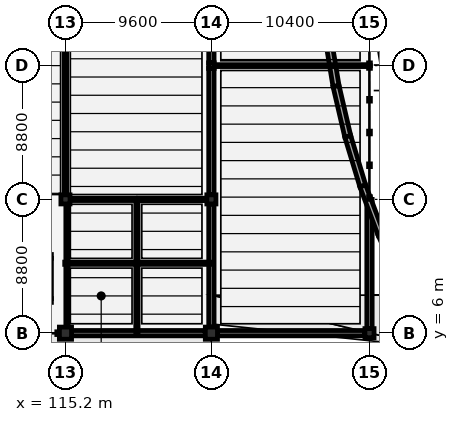
"""IFC4 building model, lengths in metres.
Left out: names, types, materials, properties, quantities, classifications, styles, units other than length and angle.
Written with IfcOpenShell. Run it as: python <this file> out.ifc"""

import sys

from ifc_helpers import new_model, si_unit, direction, frame, frame_2d, origin, origin_2d, place, context, subcontext, project, spatial, rectangle, i_section, extrude, element, fill, save


model = new_model("IFC4")
c1 = context("Model", 3, precision=1e-05, world=origin(), true_north=direction((0.0, 1.0)))
c2 = subcontext(c1, "Body", "Model", "MODEL_VIEW")
j1 = project(units=[si_unit("LENGTHUNIT", "METRE"), si_unit("PLANEANGLEUNIT", "RADIAN")], contexts=[c1])
p1 = place(None, origin())
s1 = spatial("IfcSite", under=j1, at=p1, CompositionType="ELEMENT")
p2 = place(p1, origin())
s2 = spatial("IfcBuilding", under=s1, at=p2, CompositionType="ELEMENT")
p3 = place(p2, origin())
s3 = spatial("IfcBuildingStorey", under=s2, at=p3, CompositionType="ELEMENT", Elevation=0.0)
p4 = place(p3, frame((115.2, 6.0, 0.0), z_axis=(0.0, 0.0, 1.0), x_axis=(1.0, 0.0, 0.0)))
e1 = element("IfcColumn", 1, at=p4, inside=s3, PredefinedType="COLUMN", context=c2, shape_type="SweptSolid", body=[
    extrude(rectangle(XDim=0.8, YDim=0.8, at=origin_2d()), origin(), (0.0, 0.0, 1.0), 4.8),
])
p5 = place(p3, frame((115.2, 14.8, 0.0), z_axis=(0.0, 0.0, 1.0), x_axis=(1.0, 0.0, 0.0)))
e2 = element("IfcColumn", 2, at=p5, inside=s3, PredefinedType="COLUMN", context=c2, shape_type="SweptSolid", body=[
    extrude(rectangle(XDim=0.6, YDim=0.6, at=origin_2d()), origin(), (0.0, 0.0, 1.0), 4.8),
])
p6 = place(p3, frame((124.8, 6.0, 0.0), z_axis=(0.0, 0.0, 1.0), x_axis=(1.0, 0.0, 0.0)))
e3 = element("IfcColumn", 3, at=p6, inside=s3, PredefinedType="COLUMN", context=c2, shape_type="SweptSolid", body=[
    extrude(rectangle(XDim=0.8, YDim=0.8, at=origin_2d()), origin(), (0.0, 0.0, 1.0), 4.8),
])
p7 = place(p3, frame((124.8, 14.8, 0.0), z_axis=(0.0, 0.0, 1.0), x_axis=(1.0, 0.0, 0.0)))
e4 = element("IfcColumn", 4, at=p7, inside=s3, PredefinedType="COLUMN", context=c2, shape_type="SweptSolid", body=[
    extrude(rectangle(XDim=0.6, YDim=0.6, at=origin_2d()), origin(), (0.0, 0.0, 1.0), 4.8),
])
p8 = place(p3, frame((124.8, 23.6, 0.0), z_axis=(0.0, 0.0, 1.0), x_axis=(1.0, 0.0, 0.0)))
e5 = element("IfcColumn", 5, at=p8, inside=s3, PredefinedType="COLUMN", context=c2, shape_type="SweptSolid", body=[
    extrude(i_section(OverallWidth=0.368, OverallDepth=0.368, WebThickness=0.015, FlangeThickness=0.024, FilletRadius=0.025, at=origin_2d()), origin(), (0.0, 0.0, 1.0), 4.8),
])
p9 = place(p3, frame((135.2, 6.0, 0.0), z_axis=(0.0, 0.0, 1.0), x_axis=(1.0, 0.0, 0.0)))
e6 = element("IfcColumn", 6, at=p9, inside=s3, PredefinedType="COLUMN", context=c2, shape_type="SweptSolid", body=[
    extrude(rectangle(XDim=0.6, YDim=0.6, at=origin_2d()), origin(), (0.0, 0.0, 1.0), 4.8),
])
p10 = place(p3, frame((115.6, 6.0, 0.0), z_axis=(0.0, 0.0, 1.0), x_axis=(1.0, 0.0, 0.0)))
e7 = element("IfcWall", 7, at=p10, inside=s3, PredefinedType="SOLIDWALL", context=c2, shape_type="SweptSolid", body=[
    extrude(rectangle(XDim=8.8, YDim=0.35, at=frame_2d((4.4, 0.0))), origin(), (0.0, 0.0, 1.0), 4.1),
])
p11 = place(p10, frame((1.4, 0.0, 0.0)))
e8 = element("IfcOpeningElement", 8, at=p11, cuts=e7, PredefinedType="OPENING", context=c2, shape_type="SweptSolid", body=[
    extrude(rectangle(XDim=1.96, YDim=2.37, at=frame_2d((0.98, 1.185))), frame((0.0, 0.185, 0.0), z_axis=(0.0, -1.0, 0.0), x_axis=(1.0, 0.0, 0.0)), (0.0, 0.0, 1.0), 0.37),
])
p12 = place(p10, frame((4.8, 0.0, 0.0)))
e9 = element("IfcOpeningElement", 9, at=p12, cuts=e7, PredefinedType="OPENING", context=c2, shape_type="SweptSolid", body=[
    extrude(rectangle(XDim=1.92, YDim=2.34, at=frame_2d((0.96, 1.17))), frame((0.0, 0.185, 0.0), z_axis=(0.0, -1.0, 0.0), x_axis=(1.0, 0.0, 0.0)), (0.0, 0.0, 1.0), 0.37),
])
p13 = place(p3, frame((124.8, 6.4, 0.0), z_axis=(0.0, 0.0, 1.0), x_axis=(0.0, 1.0, 0.0)))
e10 = element("IfcWall", 10, at=p13, inside=s3, PredefinedType="SOLIDWALL", context=c2, shape_type="SweptSolid", body=[
    extrude(rectangle(XDim=8.1, YDim=0.35, at=frame_2d((4.05, 0.0))), origin(), (0.0, 0.0, 1.0), 4.1),
])
p14 = place(p3, frame((124.8, 15.1, 0.0), z_axis=(0.0, 0.0, 1.0), x_axis=(0.0, 1.0, 0.0)))
e11 = element("IfcWall", 11, at=p14, inside=s3, PredefinedType="SOLIDWALL", context=c2, shape_type="SweptSolid", body=[
    extrude(rectangle(XDim=8.316, YDim=0.35, at=frame_2d((4.158, 0.0))), origin(), (0.0, 0.0, 1.0), 4.1),
])
p15 = place(p14, frame((3.0, 0.0, 0.0)))
e12 = element("IfcOpeningElement", 12, at=p15, cuts=e11, PredefinedType="OPENING", context=c2, shape_type="SweptSolid", body=[
    extrude(rectangle(XDim=1.8, YDim=2.4, at=frame_2d((0.9, 1.2))), frame((0.0, 0.185, 0.0), z_axis=(0.0, -1.0, 0.0), x_axis=(1.0, 0.0, 0.0)), (0.0, 0.0, 1.0), 0.37),
])
p16 = place(p3, frame((124.8, 23.784, 0.0), z_axis=(0.0, 0.0, 1.0), x_axis=(0.0, 1.0, 0.0)))
e13 = element("IfcWall", 13, at=p16, inside=s3, PredefinedType="SOLIDWALL", context=c2, shape_type="SweptSolid", body=[
    extrude(rectangle(XDim=8.432, YDim=0.35, at=frame_2d((4.216, 0.0))), origin(), (0.0, 0.0, 1.0), 4.1),
])
p17 = place(p16, frame((3.0, 0.0, 0.0)))
e14 = element("IfcOpeningElement", 14, at=p17, cuts=e13, PredefinedType="OPENING", context=c2, shape_type="SweptSolid", body=[
    extrude(rectangle(XDim=1.76, YDim=2.37, at=frame_2d((0.88, 1.185))), frame((0.0, 0.185, 0.0), z_axis=(0.0, -1.0, 0.0), x_axis=(1.0, 0.0, 0.0)), (0.0, 0.0, 1.0), 0.37),
])
p18 = place(p3, frame((135.2, 6.3, 0.0), z_axis=(0.0, 0.0, 1.0), x_axis=(0.0, 1.0, 0.0)))
e15 = element("IfcWall", 15, at=p18, inside=s3, PredefinedType="SOLIDWALL", context=c2, shape_type="SweptSolid", body=[
    extrude(rectangle(XDim=8.5, YDim=0.35, at=frame_2d((4.25, 0.0))), origin(), (0.0, 0.0, 1.0), 4.1),
])
p19 = place(p18, frame((1.6, 0.0, 0.0)))
e16 = element("IfcOpeningElement", 16, at=p19, cuts=e15, PredefinedType="OPENING", context=c2, shape_type="SweptSolid", body=[
    extrude(rectangle(XDim=1.76, YDim=2.37, at=frame_2d((0.88, 1.185))), frame((0.0, 0.185, 0.0), z_axis=(0.0, -1.0, 0.0), x_axis=(1.0, 0.0, 0.0)), (0.0, 0.0, 1.0), 0.37),
])
p20 = place(p3, frame((125.2, 6.0, 0.0), z_axis=(0.0, 0.0, 1.0), x_axis=(1.0, 0.0, 0.0)))
e17 = element("IfcWall", 17, at=p20, inside=s3, PredefinedType="SOLIDWALL", context=c2, shape_type="SweptSolid", body=[
    extrude(rectangle(XDim=9.7, YDim=0.35, at=frame_2d((4.85, 0.0))), origin(), (0.0, 0.0, 1.0), 4.1),
])
p21 = place(p3, frame((135.816, 26.056, -1.3), z_axis=(0.0, 0.0, 1.0), x_axis=(0.162941931057, -0.98663566077, 0.0)))
e18 = element("IfcWall", 18, at=p21, inside=s3, PredefinedType="SOLIDWALL", context=c2, shape_type="SweptSolid", body=[
    extrude(rectangle(XDim=3.179, YDim=0.4, at=frame_2d((1.59, 0.0))), origin(), (0.0, 0.0, 1.0), 5.84),
])
p22 = place(p3, frame((132.445, 25.613, -1.3), z_axis=(0.0, 0.0, 1.0), x_axis=(0.162758630432, -0.986665915201, 0.0)))
e19 = element("IfcWall", 19, at=p22, inside=s3, PredefinedType="SOLIDWALL", context=c2, shape_type="SweptSolid", body=[
    extrude(rectangle(XDim=3.404, YDim=0.4, at=frame_2d((1.702, 0.0))), origin(), (0.0, 0.0, 1.0), 5.84),
])
p23 = place(p3, frame((132.999, 22.255, -1.3), z_axis=(0.0, 0.0, 1.0), x_axis=(0.227143430466, -0.973861315587, 0.0)))
e20 = element("IfcWall", 20, at=p23, inside=s3, PredefinedType="SOLIDWALL", context=c2, shape_type="SweptSolid", body=[
    extrude(rectangle(XDim=3.403, YDim=0.4, at=frame_2d((1.701, 0.0))), origin(), (0.0, 0.0, 1.0), 5.84),
])
p24 = place(p3, frame((133.772, 18.941, -1.3), z_axis=(0.0, 0.0, 1.0), x_axis=(0.290387746123, -0.956909064071, 0.0)))
e21 = element("IfcWall", 21, at=p24, inside=s3, PredefinedType="SOLIDWALL", context=c2, shape_type="SweptSolid", body=[
    extrude(rectangle(XDim=3.403, YDim=0.4, at=frame_2d((1.701, 0.0))), origin(), (0.0, 0.0, 1.0), 5.84),
])
for number, where, z_axis, x_axis in (
    (22, (134.76, 15.685, -1.3), (0.0, 0.0, 1.0), (0.352, -0.936, 0.0)),
    (23, (135.958, 12.5, -1.3), (0.0, 0.0, 1.0), (0.413, -0.911, 0.0)),
):
    element("IfcWall", number, at=place(p3, frame(where, z_axis=z_axis, x_axis=x_axis)), inside=s3, PredefinedType="SOLIDWALL", context=c2, shape_type="SweptSolid", body=[
        extrude(rectangle(XDim=3.403, YDim=0.4, at=frame_2d((1.701, 0.0))), origin(), (0.0, 0.0, 1.0), 5.84),
    ])
p25 = place(p3, frame((115.2, 14.9, 0.0), z_axis=(0.0, 0.0, 1.0), x_axis=(0.0, 1.0, 0.0)))
e24 = element("IfcWall", 24, at=p25, inside=s3, PredefinedType="PARTITIONING", context=c2, shape_type="SweptSolid", body=[
    extrude(rectangle(XDim=17.4, YDim=0.16, at=frame_2d((8.7, 0.0))), origin(), (0.0, 0.0, 1.0), 4.42),
])
p26 = place(p25, frame((7.8, 0.0, 0.0)))
e25 = element("IfcOpeningElement", 25, at=p26, cuts=e24, PredefinedType="OPENING", context=c2, shape_type="SweptSolid", body=[
    extrude(rectangle(XDim=1.8, YDim=2.15, at=frame_2d((0.9, 1.075))), frame((0.0, 0.09, 0.0), z_axis=(0.0, -1.0, 0.0), x_axis=(1.0, 0.0, 0.0)), (0.0, 0.0, 1.0), 0.18),
])
p27 = place(p3, frame((115.15, 14.8, 0.0), z_axis=(0.0, 0.0, 1.0), x_axis=(1.0, 0.0, 0.0)))
e26 = element("IfcWall", 26, at=p27, inside=s3, PredefinedType="PARTITIONING", context=c2, shape_type="SweptSolid", body=[
    extrude(rectangle(XDim=4.65, YDim=0.15, at=frame_2d((2.325, 0.0))), origin(), (0.0, 0.0, 1.0), 3.835),
])
p28 = place(p27, frame((1.85, 0.0, 0.0)))
e27 = element("IfcOpeningElement", 27, at=p28, cuts=e26, PredefinedType="OPENING", context=c2, shape_type="SweptSolid", body=[
    extrude(rectangle(XDim=0.95, YDim=2.15, at=frame_2d((0.475, 1.075))), frame((0.0, 0.085, 0.0), z_axis=(0.0, -1.0, 0.0), x_axis=(1.0, 0.0, 0.0)), (0.0, 0.0, 1.0), 0.17),
])
p29 = place(p3, frame((120.0, 14.8, 0.0), z_axis=(0.0, 0.0, 1.0), x_axis=(1.0, 0.0, 0.0)))
e28 = element("IfcWall", 28, at=p29, inside=s3, PredefinedType="PARTITIONING", context=c2, shape_type="SweptSolid", body=[
    extrude(rectangle(XDim=4.75, YDim=0.16, at=frame_2d((2.375, 0.0))), origin(), (0.0, 0.0, 1.0), 3.835),
])
p30 = place(p29, frame((1.475, 0.0, 0.0)))
e29 = element("IfcOpeningElement", 29, at=p30, cuts=e28, PredefinedType="OPENING", context=c2, shape_type="SweptSolid", body=[
    extrude(rectangle(XDim=1.8, YDim=2.15, at=frame_2d((0.9, 1.075))), frame((0.0, 0.09, 0.0), z_axis=(0.0, -1.0, 0.0), x_axis=(1.0, 0.0, 0.0)), (0.0, 0.0, 1.0), 0.18),
])
p31 = place(p3, frame((119.9, 6.05, 0.0), z_axis=(0.0, 0.0, 1.0), x_axis=(0.0, 1.0, 0.0)))
e30 = element("IfcWall", 30, at=p31, inside=s3, PredefinedType="PARTITIONING", context=c2, shape_type="SweptSolid", body=[
    extrude(rectangle(XDim=4.45, YDim=0.15, at=frame_2d((2.225, 0.0))), origin(), (0.0, 0.0, 1.0), 4.42),
])
p32 = place(p3, frame((115.15, 10.6, 0.0), z_axis=(0.0, 0.0, 1.0), x_axis=(1.0, 0.0, 0.0)))
e31 = element("IfcWall", 31, at=p32, inside=s3, PredefinedType="PARTITIONING", context=c2, shape_type="SweptSolid", body=[
    extrude(rectangle(XDim=4.65, YDim=0.15, at=frame_2d((2.325, 0.0))), origin(), (0.0, 0.0, 1.0), 4.42),
])
p33 = place(p3, frame((120.0, 10.6, 0.0), z_axis=(0.0, 0.0, 1.0), x_axis=(1.0, 0.0, 0.0)))
e32 = element("IfcWall", 32, at=p33, inside=s3, PredefinedType="PARTITIONING", context=c2, shape_type="SweptSolid", body=[
    extrude(rectangle(XDim=4.75, YDim=0.15, at=frame_2d((2.375, 0.0))), origin(), (0.0, 0.0, 1.0), 4.42),
])
p34 = place(p33, frame((1.925, 0.0, 0.0)))
e33 = element("IfcOpeningElement", 33, at=p34, cuts=e32, PredefinedType="OPENING", context=c2, shape_type="SweptSolid", body=[
    extrude(rectangle(XDim=0.9, YDim=2.15, at=frame_2d((0.45, 1.075))), frame((0.0, 0.085, 0.0), z_axis=(0.0, -1.0, 0.0), x_axis=(1.0, 0.0, 0.0)), (0.0, 0.0, 1.0), 0.17),
])
p35 = place(p3, frame((119.9, 10.7, 0.0), z_axis=(0.0, 0.0, 1.0), x_axis=(0.0, 1.0, 0.0)))
e34 = element("IfcWall", 34, at=p35, inside=s3, PredefinedType="PARTITIONING", context=c2, shape_type="SweptSolid", body=[
    extrude(rectangle(XDim=4.0, YDim=0.15, at=frame_2d((2.0, 0.0))), origin(), (0.0, 0.0, 1.0), 4.42),
])
p36 = place(p35, frame((1.525, 0.0, 0.0)))
e35 = element("IfcOpeningElement", 35, at=p36, cuts=e34, PredefinedType="OPENING", context=c2, shape_type="SweptSolid", body=[
    extrude(rectangle(XDim=0.95, YDim=2.15, at=frame_2d((0.475, 1.075))), frame((0.0, 0.085, 0.0), z_axis=(0.0, -1.0, 0.0), x_axis=(1.0, 0.0, 0.0)), (0.0, 0.0, 1.0), 0.17),
])
p37 = place(p3, frame((124.75, 23.6, 0.0), z_axis=(0.0, 0.0, 1.0), x_axis=(1.0, 0.0, 0.0)))
e36 = element("IfcWall", 36, at=p37, inside=s3, PredefinedType="PARTITIONING", context=c2, shape_type="SweptSolid", body=[
    extrude(rectangle(XDim=10.4, YDim=0.125, at=frame_2d((5.2, 0.0))), origin(), (0.0, 0.0, 1.0), 3.835),
])
p38 = place(p3, frame((115.3, 6.05, 0.0), z_axis=(0.0, 0.0, 1.0), x_axis=(0.0, 1.0, 0.0)))
e37 = element("IfcWall", 37, at=p38, inside=s3, PredefinedType="PARTITIONING", context=c2, shape_type="SweptSolid", body=[
    extrude(rectangle(XDim=4.31, YDim=0.15, at=frame_2d((2.155, 0.0))), origin(), (0.0, 0.0, 1.0), 4.067),
])
p39 = place(p38, frame((1.705, 0.0, 0.0)))
e38 = element("IfcOpeningElement", 38, at=p39, cuts=e37, PredefinedType="OPENING", context=c2, shape_type="SweptSolid", body=[
    extrude(rectangle(XDim=0.9, YDim=2.15, at=frame_2d((0.45, 1.075))), frame((0.0, 0.085, 0.0), z_axis=(0.0, -1.0, 0.0), x_axis=(1.0, 0.0, 0.0)), (0.0, 0.0, 1.0), 0.17),
])
p40 = place(p3, frame((115.3, 10.84, 0.0), z_axis=(0.0, 0.0, 1.0), x_axis=(0.0, 1.0, 0.0)))
e39 = element("IfcWall", 39, at=p40, inside=s3, PredefinedType="PARTITIONING", context=c2, shape_type="SweptSolid", body=[
    extrude(rectangle(XDim=3.72, YDim=0.15, at=frame_2d((1.86, 0.0))), origin(), (0.0, 0.0, 1.0), 4.067),
])
p41 = place(p11, origin())
e40 = element("IfcDoor", 40, at=p41, inside=s3, OperationType="DOUBLE_DOOR_SINGLE_SWING", PredefinedType="DOOR", context=c2, shape_type="SweptSolid", body=[
    extrude(rectangle(XDim=1.96, YDim=2.37, at=frame_2d((0.98, 1.185))), frame((0.0, 0.025, 0.0), z_axis=(0.0, -1.0, 0.0), x_axis=(1.0, 0.0, 0.0)), (0.0, 0.0, 1.0), 0.05),
])
fill(e8, e40)
p42 = place(p12, origin())
e41 = element("IfcDoor", 41, at=p42, inside=s3, OperationType="DOUBLE_DOOR_SINGLE_SWING", PredefinedType="DOOR", context=c2, shape_type="SweptSolid", body=[
    extrude(rectangle(XDim=1.92, YDim=2.34, at=frame_2d((0.96, 1.17))), frame((0.0, 0.025, 0.0), z_axis=(0.0, -1.0, 0.0), x_axis=(1.0, 0.0, 0.0)), (0.0, 0.0, 1.0), 0.05),
])
fill(e9, e41)
p43 = place(p15, origin())
e42 = element("IfcDoor", 42, at=p43, inside=s3, OperationType="DOUBLE_DOOR_SINGLE_SWING", PredefinedType="DOOR", context=c2, shape_type="SweptSolid", body=[
    extrude(rectangle(XDim=1.8, YDim=2.4, at=frame_2d((0.9, 1.2))), frame((0.0, 0.025, 0.0), z_axis=(0.0, -1.0, 0.0), x_axis=(1.0, 0.0, 0.0)), (0.0, 0.0, 1.0), 0.05),
])
fill(e12, e42)
p44 = place(p19, origin())
e43 = element("IfcDoor", 43, at=p44, inside=s3, OperationType="DOUBLE_DOOR_SINGLE_SWING", PredefinedType="DOOR", context=c2, shape_type="SweptSolid", body=[
    extrude(rectangle(XDim=1.76, YDim=2.37, at=frame_2d((0.88, 1.185))), frame((0.0, 0.025, 0.0), z_axis=(0.0, -1.0, 0.0), x_axis=(1.0, 0.0, 0.0)), (0.0, 0.0, 1.0), 0.05),
])
fill(e16, e43)
p45 = place(p26, origin())
e44 = element("IfcDoor", 44, at=p45, inside=s3, OperationType="DOUBLE_DOOR_SINGLE_SWING", PredefinedType="DOOR", context=c2, shape_type="SweptSolid", body=[
    extrude(rectangle(XDim=1.8, YDim=2.15, at=frame_2d((0.9, 1.075))), frame((0.0, 0.025, 0.0), z_axis=(0.0, -1.0, 0.0), x_axis=(1.0, 0.0, 0.0)), (0.0, 0.0, 1.0), 0.05),
])
fill(e25, e44)
p46 = place(p28, origin())
e45 = element("IfcDoor", 45, at=p46, inside=s3, OperationType="SINGLE_SWING_LEFT", PredefinedType="DOOR", context=c2, shape_type="SweptSolid", body=[
    extrude(rectangle(XDim=0.95, YDim=2.15, at=frame_2d((0.475, 1.075))), frame((0.0, 0.025, 0.0), z_axis=(0.0, -1.0, 0.0), x_axis=(1.0, 0.0, 0.0)), (0.0, 0.0, 1.0), 0.05),
])
fill(e27, e45)
p47 = place(p30, origin())
e46 = element("IfcDoor", 46, at=p47, inside=s3, OperationType="DOUBLE_DOOR_SINGLE_SWING", PredefinedType="DOOR", context=c2, shape_type="SweptSolid", body=[
    extrude(rectangle(XDim=1.8, YDim=2.15, at=frame_2d((0.9, 1.075))), frame((0.0, 0.025, 0.0), z_axis=(0.0, -1.0, 0.0), x_axis=(1.0, 0.0, 0.0)), (0.0, 0.0, 1.0), 0.05),
])
fill(e29, e46)
p48 = place(p34, origin())
e47 = element("IfcDoor", 47, at=p48, inside=s3, OperationType="SINGLE_SWING_LEFT", PredefinedType="DOOR", context=c2, shape_type="SweptSolid", body=[
    extrude(rectangle(XDim=0.9, YDim=2.15, at=frame_2d((0.45, 1.075))), frame((0.0, 0.025, 0.0), z_axis=(0.0, -1.0, 0.0), x_axis=(1.0, 0.0, 0.0)), (0.0, 0.0, 1.0), 0.05),
])
fill(e33, e47)
p49 = place(p36, origin())
e48 = element("IfcDoor", 48, at=p49, inside=s3, OperationType="SINGLE_SWING_RIGHT", PredefinedType="DOOR", context=c2, shape_type="SweptSolid", body=[
    extrude(rectangle(XDim=0.95, YDim=2.15, at=frame_2d((0.475, 1.075))), frame((0.0, 0.025, 0.0), z_axis=(0.0, -1.0, 0.0), x_axis=(1.0, 0.0, 0.0)), (0.0, 0.0, 1.0), 0.05),
])
fill(e35, e48)
p50 = place(p39, origin())
e49 = element("IfcDoor", 49, at=p50, inside=s3, OperationType="SINGLE_SWING_RIGHT", PredefinedType="DOOR", context=c2, shape_type="SweptSolid", body=[
    extrude(rectangle(XDim=0.9, YDim=2.15, at=frame_2d((0.45, 1.075))), frame((0.0, 0.025, 0.0), z_axis=(0.0, -1.0, 0.0), x_axis=(1.0, 0.0, 0.0)), (0.0, 0.0, 1.0), 0.05),
])
fill(e38, e49)
save(model, sys.argv[1])
